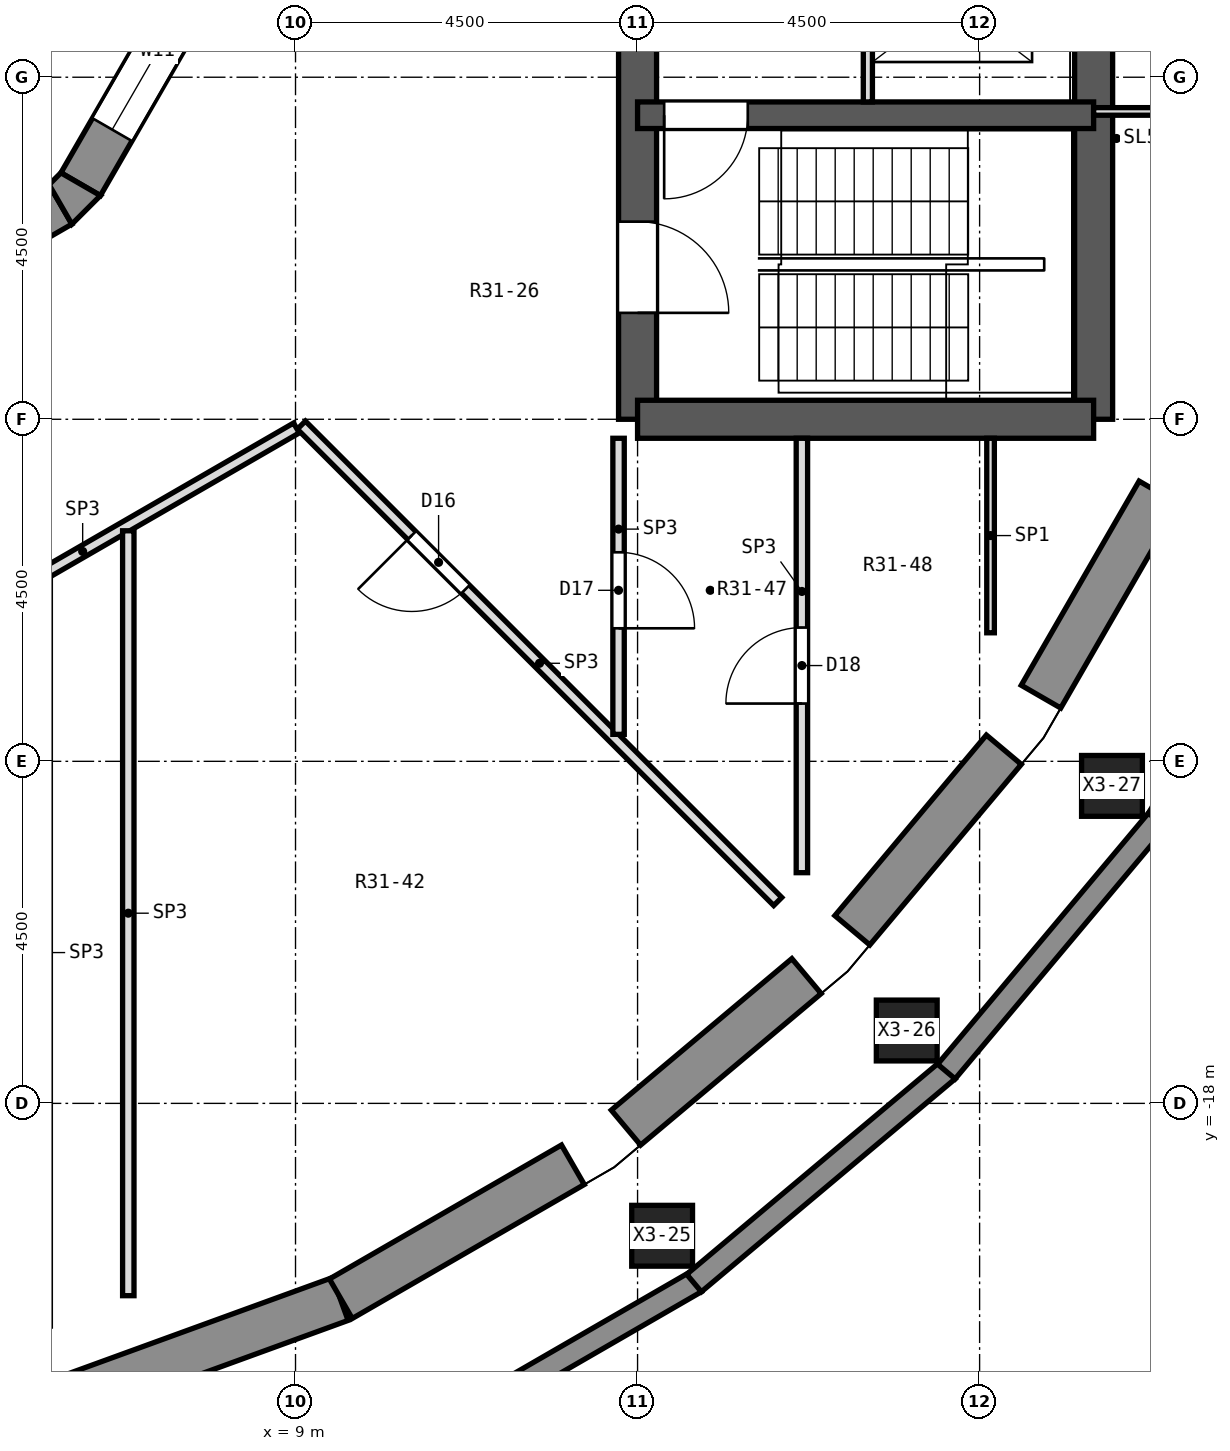
"""IFC4 building model, lengths in metres.
Left out: names, types, materials, properties, quantities, classifications, styles, units other than length and angle.
Written with IfcOpenShell. Run it as: python <this file> out.ifc"""

import sys

from ifc_helpers import new_model, si_unit, direction, frame, frame_2d, origin, origin_2d, place, context, subcontext, project, spatial, polyline, rectangle, hollow_rectangle, outline, extrude, element, fill, save


model = new_model("IFC4")
c1 = context("Model", 3, precision=1e-05, world=origin(), true_north=direction((0.0, 1.0)))
c2 = subcontext(c1, "Body", "Model", "MODEL_VIEW")
j1 = project(units=[si_unit("LENGTHUNIT", "METRE"), si_unit("PLANEANGLEUNIT", "RADIAN")], contexts=[c1])
p1 = place(None, origin())
s1 = spatial("IfcSite", under=j1, at=p1, CompositionType="ELEMENT")
p2 = place(p1, origin())
s2 = spatial("IfcBuilding", under=s1, at=p2, CompositionType="ELEMENT")
p3 = place(p2, frame((0.0, 0.0, 220.2)))
s3 = spatial("IfcBuildingStorey", under=s2, at=p3, CompositionType="ELEMENT", Elevation=220.2)
p4 = place(p3, frame((13.823, -19.741, 0.196), z_axis=(-0.281066923483, 0.401353278691, 0.871732143613), x_axis=(-0.819117203636, -0.573626190743, 0.0)))
e1 = element("IfcColumn", 1, at=p4, inside=s3, PredefinedType="COLUMN", context=c2, shape_type="SweptSolid", body=[
    extrude(hollow_rectangle(XDim=0.8, YDim=0.8, WallThickness=0.05, at=origin_2d()), origin(), (0.0, 0.0, 1.0), 4.082),
])
p5 = place(p3, frame((17.041, -17.041, 0.196), z_axis=(-0.346495601837, 0.346495601837, 0.871711876605), x_axis=(-0.707106781187, -0.707106781187, 0.0)))
e2 = element("IfcColumn", 2, at=p5, inside=s3, PredefinedType="COLUMN", context=c2, shape_type="SweptSolid", body=[
    extrude(hollow_rectangle(XDim=0.8, YDim=0.8, WallThickness=0.05, at=origin_2d()), origin(), (0.0, 0.0, 1.0), 4.082),
])
p6 = place(p3, frame((19.741, -13.823, 0.196), z_axis=(-0.401353278691, 0.281066923483, 0.871732143613), x_axis=(-0.573626190743, -0.819117203636, 0.0)))
e3 = element("IfcColumn", 3, at=p6, inside=s3, PredefinedType="COLUMN", context=c2, shape_type="SweptSolid", body=[
    extrude(hollow_rectangle(XDim=0.8, YDim=0.8, WallThickness=0.05, at=origin_2d()), origin(), (0.0, 0.0, 1.0), 4.082),
])
p7 = place(p3, frame((21.842, -10.185, 0.196), z_axis=(-0.444111400041, 0.207072547736, 0.871714416726), x_axis=(-0.422584737529, -0.906323418878, 0.0)))
e4 = element("IfcColumn", 4, at=p7, inside=s3, PredefinedType="COLUMN", context=c2, shape_type="SweptSolid", body=[
    extrude(hollow_rectangle(XDim=0.8, YDim=0.8, WallThickness=0.05, at=origin_2d()), origin(), (0.0, 0.0, 1.0), 4.082),
])
p8 = place(p3, frame((13.5, -9.0, 0.0), z_axis=(0.0, 0.0, 1.0), x_axis=(0.0, 1.0, 0.0)))
e5 = element("IfcWall", 5, at=p8, inside=s3, PredefinedType="SHEAR", context=c2, shape_type="SweptSolid", body=[
    extrude(rectangle(XDim=18.0, YDim=0.5, at=frame_2d((9.0, 0.0))), origin(), (0.0, 0.0, 1.0), 4.5),
])
p9 = place(p8, frame((15.4, 0.0, 0.0)))
e6 = element("IfcOpeningElement", 6, at=p9, cuts=e5, PredefinedType="OPENING", context=c2, shape_type="SweptSolid", body=[
    extrude(rectangle(XDim=1.2, YDim=2.1, at=frame_2d((0.6, 1.05))), frame((0.0, 0.262, 0.0), z_axis=(0.0, -1.0, 0.0), x_axis=(1.0, 0.0, 0.0)), (0.0, 0.0, 1.0), 0.524),
])
p10 = place(p8, frame((1.4, 0.0, 0.0)))
e7 = element("IfcOpeningElement", 7, at=p10, cuts=e5, PredefinedType="OPENING", context=c2, shape_type="SweptSolid", body=[
    extrude(rectangle(XDim=1.2, YDim=2.1, at=frame_2d((0.6, 1.05))), frame((0.0, 0.262, 0.0), z_axis=(0.0, -1.0, 0.0), x_axis=(1.0, 0.0, 0.0)), (0.0, 0.0, 1.0), 0.524),
])
p11 = place(p8, frame((7.5, 0.0, 0.0)))
e8 = element("IfcOpeningElement", 8, at=p11, cuts=e5, PredefinedType="OPENING", context=c2, shape_type="SweptSolid", body=[
    extrude(rectangle(XDim=3.0, YDim=2.4, at=frame_2d((1.5, 1.2))), frame((0.0, 0.262, 0.0), z_axis=(0.0, -1.0, 0.0), x_axis=(1.0, 0.0, 0.0)), (0.0, 0.0, 1.0), 0.524),
])
p12 = place(p3, frame((19.5, -9.0, 0.0), z_axis=(0.0, 0.0, 1.0), x_axis=(0.0, 1.0, 0.0)))
e9 = element("IfcWall", 9, at=p12, inside=s3, PredefinedType="SHEAR", context=c2, shape_type="SweptSolid", body=[
    extrude(rectangle(XDim=18.0, YDim=0.5, at=frame_2d((9.0, 0.0))), origin(), (0.0, 0.0, 1.0), 4.5),
])
p13 = place(p12, frame((9.45, 0.0, 0.0)))
e10 = element("IfcOpeningElement", 10, at=p13, cuts=e9, PredefinedType="OPENING", context=c2, shape_type="SweptSolid", body=[
    extrude(rectangle(XDim=0.9, YDim=2.1, at=frame_2d((0.45, 1.05))), frame((0.0, 0.262, 0.0), z_axis=(0.0, -1.0, 0.0), x_axis=(1.0, 0.0, 0.0)), (0.0, 0.0, 1.0), 0.524),
])
p14 = place(p12, frame((7.65, 0.0, 0.0)))
e11 = element("IfcOpeningElement", 11, at=p14, cuts=e9, PredefinedType="OPENING", context=c2, shape_type="SweptSolid", body=[
    extrude(rectangle(XDim=0.9, YDim=2.1, at=frame_2d((0.45, 1.05))), frame((0.0, 0.262, 0.0), z_axis=(0.0, -1.0, 0.0), x_axis=(1.0, 0.0, 0.0)), (0.0, 0.0, 1.0), 0.524),
])
p15 = place(p3, frame((13.5, -9.0, 0.0), z_axis=(0.0, 0.0, 1.0), x_axis=(1.0, 0.0, 0.0)))
e12 = element("IfcWall", 12, at=p15, inside=s3, PredefinedType="SHEAR", context=c2, shape_type="SweptSolid", body=[
    extrude(rectangle(XDim=6.0, YDim=0.5, at=frame_2d((3.0, 0.0))), origin(), (0.0, 0.0, 1.0), 4.5),
])
p16 = place(p3, frame((13.5, -5.0, 0.0), z_axis=(0.0, 0.0, 1.0), x_axis=(1.0, 0.0, 0.0)))
e13 = element("IfcWall", 13, at=p16, inside=s3, PredefinedType="SHEAR", context=c2, shape_type="SweptSolid", body=[
    extrude(rectangle(XDim=6.0, YDim=0.35, at=frame_2d((3.0, 0.0))), origin(), (0.0, 0.0, 1.0), 4.5),
])
p17 = place(p16, frame((0.35, 0.0, 0.0)))
e14 = element("IfcOpeningElement", 14, at=p17, cuts=e13, PredefinedType="OPENING", context=c2, shape_type="SweptSolid", body=[
    extrude(rectangle(XDim=1.1, YDim=2.1, at=frame_2d((0.55, 1.05))), frame((0.0, 0.187, 0.0), z_axis=(0.0, -1.0, 0.0), x_axis=(1.0, 0.0, 0.0)), (0.0, 0.0, 1.0), 0.374),
])
p18 = place(p3, frame((5.878, -21.924, 0.0), z_axis=(0.0, 0.0, 1.0), x_axis=(0.939699526391, 0.342001169736, 0.0)))
e15 = element("IfcWall", 15, at=p18, inside=s3, PredefinedType="SOLIDWALL", context=c2, shape_type="SweptSolid", body=[
    extrude(rectangle(XDim=3.949, YDim=0.6, at=frame_2d((1.975, 0.0))), origin(), (0.0, 0.0, 1.0), 3.95),
])
p19 = place(p3, frame((9.596, -20.57, 0.0), z_axis=(0.0, 0.0, 1.0), x_axis=(0.86601836006, 0.500012199891, 0.0)))
e16 = element("IfcWall", 16, at=p19, inside=s3, PredefinedType="SOLIDWALL", context=c2, shape_type="SweptSolid", body=[
    extrude(rectangle(XDim=3.525, YDim=0.6, at=frame_2d((1.763, 0.0))), origin(), (0.0, 0.0, 1.0), 3.95),
])
for number, where, z_axis, x_axis in (
    (17, (13.347, -18.319, 0.0), (0.0, 0.0, 1.0), (0.766, 0.643, 0.0)),
    (18, (16.325, -15.723, 0.0), (0.0, 0.0, 1.0), (0.643, 0.766, 0.0)),
    (19, (18.808, -12.649, 0.0), (0.0, 0.0, 1.0), (0.5, 0.866, 0.0)),
):
    element("IfcWall", number, at=place(p3, frame(where, z_axis=z_axis, x_axis=x_axis)), inside=s3, PredefinedType="SOLIDWALL", context=c2, shape_type="SweptSolid", body=[
        extrude(rectangle(XDim=3.101, YDim=0.6, at=frame_2d((1.551, 0.0))), origin(), (0.0, 0.0, 1.0), 3.95),
    ])
p20 = place(p3, frame((2.393, -8.203, 0.0), z_axis=(0.0, 0.0, 1.0), x_axis=(0.866028316509, 0.499994954979, 0.0)))
e20 = element("IfcWall", 20, at=p20, inside=s3, PredefinedType="SOLIDWALL", context=c2, shape_type="SweptSolid", body=[
    extrude(rectangle(XDim=4.059, YDim=0.6, at=frame_2d((2.029, 0.0))), origin(), (0.0, 0.0, 1.0), 3.95),
])
p21 = place(p20, frame((0.829, 0.0, 1.5)))
e21 = element("IfcOpeningElement", 21, at=p21, cuts=e20, PredefinedType="OPENING", context=c2, shape_type="SweptSolid", body=[
    extrude(rectangle(XDim=2.4, YDim=2.0, at=frame_2d((1.2, 1.0))), frame((0.0, 0.312, 0.0), z_axis=(0.0, -1.0, 0.0), x_axis=(1.0, 0.0, 0.0)), (0.0, 0.0, 1.0), 0.624),
])
p22 = place(p3, frame((6.173, -5.907, 0.0), z_axis=(0.0, 0.0, 1.0), x_axis=(0.499994954979, 0.866028316509, 0.0)))
e22 = element("IfcWall", 22, at=p22, inside=s3, PredefinedType="SOLIDWALL", context=c2, shape_type="SweptSolid", body=[
    extrude(rectangle(XDim=4.059, YDim=0.6, at=frame_2d((2.029, 0.0))), origin(), (0.0, 0.0, 1.0), 3.95),
])
p23 = place(p22, frame((0.829, 0.0, 1.5)))
e23 = element("IfcOpeningElement", 23, at=p23, cuts=e22, PredefinedType="OPENING", context=c2, shape_type="SweptSolid", body=[
    extrude(rectangle(XDim=2.4, YDim=2.0, at=frame_2d((1.2, 1.0))), frame((0.0, 0.312, 0.0), z_axis=(0.0, -1.0, 0.0), x_axis=(1.0, 0.0, 0.0)), (0.0, 0.0, 1.0), 0.624),
])
p24 = place(p3, origin())
e24 = element("IfcWall", 24, at=p24, inside=s3, PredefinedType="SOLIDWALL", context=c2, shape_type="SweptSolid", body=[
    extrude(outline(polyline([(6.433, -6.058), (5.914, -5.758), (5.758, -5.914), (6.058, -6.433), (6.433, -6.058)])), origin(), (0.0, 0.0, 1.0), 3.95),
])
for number, where, z_axis, x_axis in (
    (25, (10.49, -22.528, 0.0), (0.0, 0.0, 1.0), (0.866, 0.5, 0.0)),
    (26, (14.243, -20.364, 0.0), (0.0, 0.0, 1.0), (0.766, 0.643, 0.0)),
    (27, (17.563, -17.581, 0.0), (0.0, 0.0, 1.0), (0.643, 0.766, 0.0)),
    (28, (20.349, -14.264, 0.0), (0.0, 0.0, 1.0), (0.5, 0.866, 0.0)),
):
    element("IfcWall", number, at=place(p3, frame(where, z_axis=z_axis, x_axis=x_axis)), inside=s3, PredefinedType="PARAPET", context=c2, shape_type="SweptSolid", body=[
        extrude(rectangle(XDim=4.358, YDim=0.3, at=frame_2d((2.179, 0.0))), origin(), (0.0, 0.0, 1.0), 1.1),
    ])
p25 = place(p3, frame((9.077, -9.077, 0.0), z_axis=(0.0, 0.0, 1.0), x_axis=(0.707106781187, -0.707106781187, 0.0)))
e29 = element("IfcWall", 29, at=p25, inside=s3, PredefinedType="PARTITIONING", context=c2, shape_type="SweptSolid", body=[
    extrude(rectangle(XDim=8.863, YDim=0.15, at=frame_2d((4.432, 0.0))), origin(), (0.0, 0.0, 1.0), 3.95),
])
p26 = place(p25, frame((2.053, 0.0, 0.0)))
e30 = element("IfcOpeningElement", 30, at=p26, cuts=e29, PredefinedType="OPENING", context=c2, shape_type="SweptSolid", body=[
    extrude(rectangle(XDim=1.0, YDim=2.1, at=frame_2d((0.5, 1.05))), frame((0.0, 0.087, 0.0), z_axis=(0.0, -1.0, 0.0), x_axis=(1.0, 0.0, 0.0)), (0.0, 0.0, 1.0), 0.174),
])
p27 = place(p3, frame((3.388, -12.363, 0.0), z_axis=(0.0, 0.0, 1.0), x_axis=(0.865967095912, 0.5001009786, 0.0)))
e31 = element("IfcWall", 31, at=p27, inside=s3, PredefinedType="PARTITIONING", context=c2, shape_type="SweptSolid", body=[
    extrude(rectangle(XDim=6.495, YDim=0.15, at=frame_2d((3.248, 0.0))), origin(), (0.0, 0.0, 1.0), 3.95),
])
p28 = place(p27, frame((0.798, 0.0, 0.0)))
e32 = element("IfcOpeningElement", 32, at=p28, cuts=e31, PredefinedType="OPENING", context=c2, shape_type="SweptSolid", body=[
    extrude(rectangle(XDim=1.0, YDim=2.1, at=frame_2d((0.5, 1.05))), frame((0.0, 0.087, 0.0), z_axis=(0.0, -1.0, 0.0), x_axis=(1.0, 0.0, 0.0)), (0.0, 0.0, 1.0), 0.174),
])
p29 = place(p3, frame((18.144, -11.809, 0.0), z_axis=(0.0, 0.0, 1.0), x_axis=(0.0, 1.0, 0.0)))
e33 = element("IfcWall", 33, at=p29, inside=s3, PredefinedType="PARTITIONING", context=c2, shape_type="SweptSolid", body=[
    extrude(rectangle(XDim=2.559, YDim=0.1, at=frame_2d((1.28, 0.0))), origin(), (0.0, 0.0, 1.0), 3.95),
])
p30 = place(p3, frame((15.662, -14.965, 0.0), z_axis=(0.0, 0.0, 1.0), x_axis=(0.0, 1.0, 0.0)))
e34 = element("IfcWall", 34, at=p30, inside=s3, PredefinedType="PARTITIONING", context=c2, shape_type="SweptSolid", body=[
    extrude(rectangle(XDim=5.715, YDim=0.15, at=frame_2d((2.857, 0.0))), origin(), (0.0, 0.0, 1.0), 3.95),
])
p31 = place(p30, frame((2.225, 0.0, 0.0)))
e35 = element("IfcOpeningElement", 35, at=p31, cuts=e34, PredefinedType="OPENING", context=c2, shape_type="SweptSolid", body=[
    extrude(rectangle(XDim=1.0, YDim=2.1, at=frame_2d((0.5, 1.05))), frame((0.0, 0.087, 0.0), z_axis=(0.0, -1.0, 0.0), x_axis=(1.0, 0.0, 0.0)), (0.0, 0.0, 1.0), 0.174),
])
p32 = place(p3, frame((13.25, -13.145, 0.0), z_axis=(0.0, 0.0, 1.0), x_axis=(0.0, 1.0, 0.0)))
e36 = element("IfcWall", 36, at=p32, inside=s3, PredefinedType="PARTITIONING", context=c2, shape_type="SweptSolid", body=[
    extrude(rectangle(XDim=3.895, YDim=0.15, at=frame_2d((1.948, 0.0))), origin(), (0.0, 0.0, 1.0), 3.95),
])
p33 = place(p32, frame((1.395, 0.0, 0.0)))
e37 = element("IfcOpeningElement", 37, at=p33, cuts=e36, PredefinedType="OPENING", context=c2, shape_type="SweptSolid", body=[
    extrude(rectangle(XDim=1.0, YDim=2.1, at=frame_2d((0.5, 1.05))), frame((0.0, 0.087, 0.0), z_axis=(0.0, -1.0, 0.0), x_axis=(1.0, 0.0, 0.0)), (0.0, 0.0, 1.0), 0.174),
])
p34 = place(p3, frame((6.8, -20.53, 0.0), z_axis=(0.0, 0.0, 1.0), x_axis=(0.0, 1.0, 0.0)))
e38 = element("IfcWall", 38, at=p34, inside=s3, PredefinedType="PARTITIONING", context=c2, shape_type="SweptSolid", body=[
    extrude(rectangle(XDim=10.063, YDim=0.15, at=frame_2d((5.031, 0.0))), origin(), (0.0, 0.0, 1.0), 3.95),
])
p35 = place(p3, frame((19.5, -4.95, 0.0), z_axis=(0.0, 0.0, 1.0), x_axis=(1.0, 0.0, 0.0)))
e39 = element("IfcWall", 39, at=p35, inside=s3, PredefinedType="PARTITIONING", context=c2, shape_type="SweptSolid", body=[
    extrude(rectangle(XDim=2.284, YDim=0.1, at=frame_2d((1.142, 0.0))), origin(), (0.0, 0.0, 1.0), 3.95),
])
p36 = place(p3, frame((16.53, -4.825, 0.0), z_axis=(0.0, 0.0, 1.0), x_axis=(0.0, 1.0, 0.0)))
e40 = element("IfcWall", 40, at=p36, inside=s3, PredefinedType="PARTITIONING", context=c2, shape_type="SweptSolid", body=[
    extrude(rectangle(XDim=2.65, YDim=0.12, at=frame_2d((1.325, 0.0))), origin(), (0.0, 0.0, 1.0), 3.95),
])
p37 = place(p36, frame((0.775, 0.0, 0.0)))
e41 = element("IfcOpeningElement", 41, at=p37, cuts=e40, PredefinedType="OPENING", context=c2, shape_type="SweptSolid", body=[
    extrude(rectangle(XDim=1.1, YDim=2.1, at=frame_2d((0.55, 1.05))), frame((0.0, 0.072, 0.0), z_axis=(0.0, -1.0, 0.0), x_axis=(1.0, 0.0, 0.0)), (0.0, 0.0, 1.0), 0.144),
])
p38 = place(p23, origin())
e42 = element("IfcWindow", 42, at=p38, inside=s3, PartitioningType="SINGLE_PANEL", PredefinedType="WINDOW", context=c2, shape_type="SweptSolid", body=[
    extrude(rectangle(XDim=2.4, YDim=2.0, at=frame_2d((1.2, 1.0))), frame((0.0, -0.12, 0.0), z_axis=(0.0, -1.0, 0.0), x_axis=(1.0, 0.0, 0.0)), (0.0, 0.0, 1.0), 0.06),
])
fill(e23, e42)
p39 = place(p26, frame((1.0, 0.0, 0.0), z_axis=(0.0, 0.0, 1.0), x_axis=(-1.0, 0.0, 0.0)))
e43 = element("IfcDoor", 43, at=p39, inside=s3, OperationType="SINGLE_SWING_RIGHT", PredefinedType="DOOR", context=c2, shape_type="SweptSolid", body=[
    extrude(rectangle(XDim=1.0, YDim=2.1, at=frame_2d((0.5, 1.05))), frame((0.0, 0.025, 0.0), z_axis=(0.0, -1.0, 0.0), x_axis=(1.0, 0.0, 0.0)), (0.0, 0.0, 1.0), 0.05),
])
fill(e30, e43)
p40 = place(p33, frame((1.0, 0.0, 0.0), z_axis=(0.0, 0.0, 1.0), x_axis=(-1.0, 0.0, 0.0)))
e44 = element("IfcDoor", 44, at=p40, inside=s3, OperationType="SINGLE_SWING_RIGHT", PredefinedType="DOOR", context=c2, shape_type="SweptSolid", body=[
    extrude(rectangle(XDim=1.0, YDim=2.1, at=frame_2d((0.5, 1.05))), frame((0.0, 0.025, 0.0), z_axis=(0.0, -1.0, 0.0), x_axis=(1.0, 0.0, 0.0)), (0.0, 0.0, 1.0), 0.05),
])
fill(e37, e44)
p41 = place(p31, origin())
e45 = element("IfcDoor", 45, at=p41, inside=s3, OperationType="SINGLE_SWING_LEFT", PredefinedType="DOOR", context=c2, shape_type="SweptSolid", body=[
    extrude(rectangle(XDim=1.0, YDim=2.1, at=frame_2d((0.5, 1.05))), frame((0.0, 0.025, 0.0), z_axis=(0.0, -1.0, 0.0), x_axis=(1.0, 0.0, 0.0)), (0.0, 0.0, 1.0), 0.05),
])
fill(e35, e45)
p42 = place(p17, frame((1.1, 0.0, 0.0), z_axis=(0.0, 0.0, 1.0), x_axis=(-1.0, 0.0, 0.0)))
e46 = element("IfcDoor", 46, at=p42, inside=s3, OperationType="SINGLE_SWING_RIGHT", PredefinedType="DOOR", context=c2, shape_type="SweptSolid", body=[
    extrude(rectangle(XDim=1.1, YDim=2.1, at=frame_2d((0.55, 1.05))), frame((0.0, 0.025, 0.0), z_axis=(0.0, -1.0, 0.0), x_axis=(1.0, 0.0, 0.0)), (0.0, 0.0, 1.0), 0.05),
])
fill(e14, e46)
p43 = place(p10, frame((1.2, 0.0, 0.0), z_axis=(0.0, 0.0, 1.0), x_axis=(-1.0, 0.0, 0.0)))
e47 = element("IfcDoor", 47, at=p43, inside=s3, OperationType="SINGLE_SWING_RIGHT", PredefinedType="DOOR", context=c2, shape_type="SweptSolid", body=[
    extrude(rectangle(XDim=1.2, YDim=2.1, at=frame_2d((0.6, 1.05))), frame((0.0, 0.025, 0.0), z_axis=(0.0, -1.0, 0.0), x_axis=(1.0, 0.0, 0.0)), (0.0, 0.0, 1.0), 0.05),
])
fill(e7, e47)
save(model, sys.argv[1])
